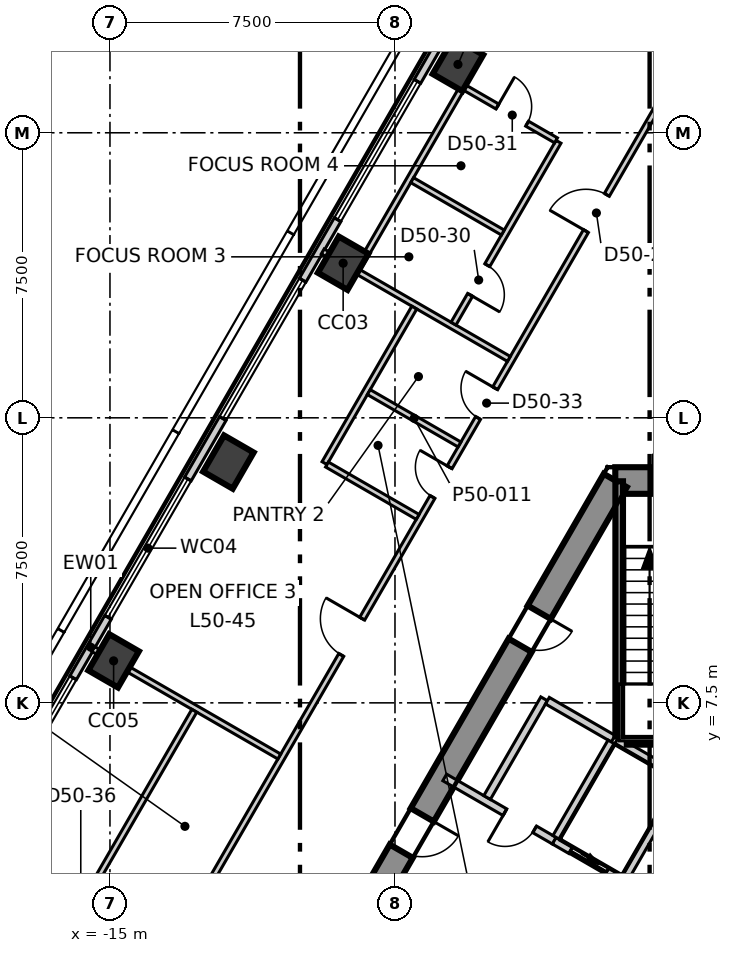
"""IFC4 building model, lengths in metres.
Left out: names, types, materials, properties, quantities, classifications, styles, units other than length and angle.
Written with IfcOpenShell. Run it as: python <this file> out.ifc"""

import sys

from ifc_helpers import new_model, si_unit, direction, frame, frame_2d, origin, origin_2d, place, context, subcontext, project, spatial, polyline, rectangle, outline, extrude, element, fill, save


model = new_model("IFC4")
c1 = context("Model", 3, precision=1e-05, world=origin(), true_north=direction((0.0, 1.0)))
c2 = subcontext(c1, "Body", "Model", "MODEL_VIEW")
j1 = project(units=[si_unit("LENGTHUNIT", "METRE"), si_unit("PLANEANGLEUNIT", "RADIAN")], contexts=[c1])
p1 = place(None, origin())
s1 = spatial("IfcSite", under=j1, at=p1, CompositionType="ELEMENT")
p2 = place(p1, origin())
s2 = spatial("IfcBuilding", under=s1, at=p2, CompositionType="ELEMENT")
p3 = place(p2, frame((0.0, 0.0, 215.3)))
s3 = spatial("IfcBuildingStorey", under=s2, at=p3, CompositionType="ELEMENT", Elevation=215.3)
p4 = place(p3, frame((1.703, 13.35, -0.3), z_axis=(0.0, 0.0, 1.0), x_axis=(-1.0, 0.0, 0.0)))
e1 = element("IfcWall", 1, at=p4, inside=s3, PredefinedType="SHEAR", context=c2, shape_type="SweptSolid", body=[
    extrude(outline(polyline([(-0.202, -0.35), (1.703, -0.35), (3.608, -0.35), (3.204, 0.35), (1.703, 0.35), (0.202, 0.35), (-0.202, -0.35)])), origin(), (0.0, 0.0, 1.0), 4.0),
])
p5 = place(p4, frame((1.003, 0.0, 0.3)))
e2 = element("IfcOpeningElement", 2, at=p5, cuts=e1, PredefinedType="OPENING", context=c2, shape_type="SweptSolid", body=[
    extrude(rectangle(XDim=1.4, YDim=2.1, at=frame_2d((0.7, 1.05))), frame((0.0, 0.36, 0.0), z_axis=(0.0, -1.0, 0.0), x_axis=(1.0, 0.0, 0.0)), (0.0, 0.0, 1.0), 0.72),
])
p6 = place(p3, frame((-1.703, 13.35, -0.3), z_axis=(0.0, 0.0, 1.0), x_axis=(-0.500011533395, -0.866018744874, 0.0)))
e3 = element("IfcWall", 3, at=p6, inside=s3, PredefinedType="SHEAR", context=c2, shape_type="SweptSolid", body=[
    extrude(outline(polyline([(-0.202, -0.35), (1.782, -0.35), (3.766, -0.35), (5.75, -0.35), (7.734, -0.35), (9.718, -0.35), (11.702, -0.35), (13.686, -0.35), (15.67, -0.35), (17.654, -0.35), (19.638, -0.35), (21.622, -0.35), (21.218, 0.35), (19.307, 0.35), (17.397, 0.35), (15.486, 0.35), (13.576, 0.35), (11.665, 0.35), (9.755, 0.35), (7.844, 0.35), (5.934, 0.35), (4.023, 0.35), (2.113, 0.35), (0.202, 0.35), (-0.202, -0.35)])), origin(), (0.0, 0.0, 1.0), 4.0),
])
p7 = place(p6, frame((10.16, 0.0, 0.3)))
e4 = element("IfcOpeningElement", 4, at=p7, cuts=e3, PredefinedType="OPENING", context=c2, shape_type="SweptSolid", body=[
    extrude(rectangle(XDim=1.1, YDim=2.1, at=frame_2d((0.55, 1.05))), frame((0.0, 0.36, 0.0), z_axis=(0.0, -1.0, 0.0), x_axis=(1.0, 0.0, 0.0)), (0.0, 0.0, 1.0), 0.72),
])
p8 = place(p6, frame((16.465, 0.0, 0.3)))
e5 = element("IfcOpeningElement", 5, at=p8, cuts=e3, PredefinedType="OPENING", context=c2, shape_type="SweptSolid", body=[
    extrude(rectangle(XDim=0.9, YDim=2.1, at=frame_2d((0.45, 1.05))), frame((0.0, 0.36, 0.0), z_axis=(0.0, -1.0, 0.0), x_axis=(1.0, 0.0, 0.0)), (0.0, 0.0, 1.0), 0.72),
])
p9 = place(p6, frame((4.005, 0.0, 0.3)))
e6 = element("IfcOpeningElement", 6, at=p9, cuts=e3, PredefinedType="OPENING", context=c2, shape_type="SweptSolid", body=[
    extrude(rectangle(XDim=1.0, YDim=2.1, at=frame_2d((0.5, 1.05))), frame((0.0, 0.36, 0.0), z_axis=(0.0, -1.0, 0.0), x_axis=(1.0, 0.0, 0.0)), (0.0, 0.0, 1.0), 0.72),
])
for number, where, z_axis, x_axis in (
    (7, (-5.843, 24.299, -0.3), (0.0, 0.0, 1.0), (0.5, 0.866, 0.0)),
    (8, (-8.864, 19.068, -0.3), (0.0, 0.0, 1.0), (0.5, 0.866, 0.0)),
    (9, (-11.884, 13.836, -0.3), (0.0, 0.0, 1.0), (0.5, 0.866, 0.0)),
    (10, (-14.904, 8.605, -0.3), (0.0, 0.0, 1.0), (0.5, 0.866, 0.0)),
):
    element("IfcColumn", number, at=place(p3, frame(where, z_axis=z_axis, x_axis=x_axis)), inside=s3, PredefinedType="COLUMN", context=c2, shape_type="SweptSolid", body=[
        extrude(rectangle(XDim=1.1, YDim=0.9, at=origin_2d()), origin(), (0.0, 0.0, 1.0), 4.0),
    ])
p10 = place(p3, frame((-2.778, 31.008, 0.0), z_axis=(0.0, 0.0, 1.0), x_axis=(-0.499999612413, -0.866025627558, 0.0)))
e11 = element("IfcWall", 11, at=p10, inside=s3, PredefinedType="ELEMENTEDWALL", context=c2, shape_type="SweptSolid", body=[
    extrude(rectangle(XDim=50.91, YDim=0.2, at=frame_2d((25.455, 0.0))), origin(), (0.0, 0.0, 1.0), 3.7),
])
p11 = place(p10, frame((2.223, 0.0, 0.9)))
e12 = element("IfcOpeningElement", 12, at=p11, cuts=e11, PredefinedType="OPENING", context=c2, shape_type="SweptSolid", body=[
    extrude(rectangle(XDim=4.2, YDim=2.5, at=frame_2d((2.1, 1.25))), frame((0.0, 0.11, 0.0), z_axis=(0.0, -1.0, 0.0), x_axis=(1.0, 0.0, 0.0)), (0.0, 0.0, 1.0), 0.22),
])
p12 = place(p10, frame((8.263, 0.0, 0.9)))
e13 = element("IfcOpeningElement", 13, at=p12, cuts=e11, PredefinedType="OPENING", context=c2, shape_type="SweptSolid", body=[
    extrude(rectangle(XDim=4.2, YDim=2.5, at=frame_2d((2.1, 1.25))), frame((0.0, 0.11, 0.0), z_axis=(0.0, -1.0, 0.0), x_axis=(1.0, 0.0, 0.0)), (0.0, 0.0, 1.0), 0.22),
])
p13 = place(p10, frame((14.304, 0.0, 0.9)))
e14 = element("IfcOpeningElement", 14, at=p13, cuts=e11, PredefinedType="OPENING", context=c2, shape_type="SweptSolid", body=[
    extrude(rectangle(XDim=4.2, YDim=2.5, at=frame_2d((2.1, 1.25))), frame((0.0, 0.11, 0.0), z_axis=(0.0, -1.0, 0.0), x_axis=(1.0, 0.0, 0.0)), (0.0, 0.0, 1.0), 0.22),
])
p14 = place(p10, frame((20.344, 0.0, 0.9)))
e15 = element("IfcOpeningElement", 15, at=p14, cuts=e11, PredefinedType="OPENING", context=c2, shape_type="SweptSolid", body=[
    extrude(rectangle(XDim=4.2, YDim=2.5, at=frame_2d((2.1, 1.25))), frame((0.0, 0.11, 0.0), z_axis=(0.0, -1.0, 0.0), x_axis=(1.0, 0.0, 0.0)), (0.0, 0.0, 1.0), 0.22),
])
p15 = place(p10, frame((26.385, 0.0, 0.9)))
e16 = element("IfcOpeningElement", 16, at=p15, cuts=e11, PredefinedType="OPENING", context=c2, shape_type="SweptSolid", body=[
    extrude(rectangle(XDim=4.2, YDim=2.5, at=frame_2d((2.1, 1.25))), frame((0.0, 0.11, 0.0), z_axis=(0.0, -1.0, 0.0), x_axis=(1.0, 0.0, 0.0)), (0.0, 0.0, 1.0), 0.22),
])
p16 = place(p10, frame((32.425, 0.0, 0.9)))
e17 = element("IfcOpeningElement", 17, at=p16, cuts=e11, PredefinedType="OPENING", context=c2, shape_type="SweptSolid", body=[
    extrude(rectangle(XDim=4.2, YDim=2.5, at=frame_2d((2.1, 1.25))), frame((0.0, 0.11, 0.0), z_axis=(0.0, -1.0, 0.0), x_axis=(1.0, 0.0, 0.0)), (0.0, 0.0, 1.0), 0.22),
])
p17 = place(p10, frame((38.466, 0.0, 0.9)))
e18 = element("IfcOpeningElement", 18, at=p17, cuts=e11, PredefinedType="OPENING", context=c2, shape_type="SweptSolid", body=[
    extrude(rectangle(XDim=4.2, YDim=2.5, at=frame_2d((2.1, 1.25))), frame((0.0, 0.11, 0.0), z_axis=(0.0, -1.0, 0.0), x_axis=(1.0, 0.0, 0.0)), (0.0, 0.0, 1.0), 0.22),
])
p18 = place(p10, frame((44.506, 0.0, 0.9)))
e19 = element("IfcOpeningElement", 19, at=p18, cuts=e11, PredefinedType="OPENING", context=c2, shape_type="SweptSolid", body=[
    extrude(rectangle(XDim=4.2, YDim=2.5, at=frame_2d((2.1, 1.25))), frame((0.0, 0.11, 0.0), z_axis=(0.0, -1.0, 0.0), x_axis=(1.0, 0.0, 0.0)), (0.0, 0.0, 1.0), 0.22),
])
p19 = place(p3, frame((-20.883, -11.97, 0.0), z_axis=(0.0, 0.0, 1.0), x_axis=(0.500006150555, 0.866021852731, 0.0)))
e20 = element("IfcWall", 20, at=p19, inside=s3, PredefinedType="PARTITIONING", context=c2, shape_type="SweptSolid", body=[
    extrude(rectangle(XDim=41.766, YDim=0.15, at=frame_2d((20.883, 0.0))), origin(), (0.0, 0.0, 1.0), 3.7),
])
p20 = place(p19, frame((36.816, 0.0, 0.0)))
e21 = element("IfcOpeningElement", 21, at=p20, cuts=e20, PredefinedType="OPENING", context=c2, shape_type="SweptSolid", body=[
    extrude(rectangle(XDim=1.1, YDim=2.1, at=frame_2d((0.55, 1.05))), frame((0.0, 0.085, 0.0), z_axis=(0.0, -1.0, 0.0), x_axis=(1.0, 0.0, 0.0)), (0.0, 0.0, 1.0), 0.17),
])
p21 = place(p19, frame((23.939, 0.0, 0.0)))
e22 = element("IfcOpeningElement", 22, at=p21, cuts=e20, PredefinedType="OPENING", context=c2, shape_type="SweptSolid", body=[
    extrude(rectangle(XDim=1.1, YDim=2.1, at=frame_2d((0.55, 1.05))), frame((0.0, 0.085, 0.0), z_axis=(0.0, -1.0, 0.0), x_axis=(1.0, 0.0, 0.0)), (0.0, 0.0, 1.0), 0.17),
])
p22 = place(p19, frame((31.139, 0.0, 0.0)))
e23 = element("IfcOpeningElement", 23, at=p22, cuts=e20, PredefinedType="OPENING", context=c2, shape_type="SweptSolid", body=[
    extrude(rectangle(XDim=0.9, YDim=2.1, at=frame_2d((0.45, 1.05))), frame((0.0, 0.085, 0.0), z_axis=(0.0, -1.0, 0.0), x_axis=(1.0, 0.0, 0.0)), (0.0, 0.0, 1.0), 0.17),
])
p23 = place(p19, frame((28.739, 0.0, 0.0)))
e24 = element("IfcOpeningElement", 24, at=p23, cuts=e20, PredefinedType="OPENING", context=c2, shape_type="SweptSolid", body=[
    extrude(rectangle(XDim=0.9, YDim=2.1, at=frame_2d((0.45, 1.05))), frame((0.0, 0.085, 0.0), z_axis=(0.0, -1.0, 0.0), x_axis=(1.0, 0.0, 0.0)), (0.0, 0.0, 1.0), 0.17),
])
p24 = place(p19, frame((14.258, 0.0, 0.0)))
e25 = element("IfcOpeningElement", 25, at=p24, cuts=e20, PredefinedType="OPENING", context=c2, shape_type="SweptSolid", body=[
    extrude(rectangle(XDim=1.1, YDim=2.1, at=frame_2d((0.55, 1.05))), frame((0.0, 0.085, 0.0), z_axis=(0.0, -1.0, 0.0), x_axis=(1.0, 0.0, 0.0)), (0.0, 0.0, 1.0), 0.17),
])
p25 = place(p19, frame((3.777, 0.0, 0.0)))
e26 = element("IfcOpeningElement", 26, at=p25, cuts=e20, PredefinedType="OPENING", context=c2, shape_type="SweptSolid", body=[
    extrude(rectangle(XDim=1.1, YDim=2.1, at=frame_2d((0.55, 1.05))), frame((0.0, 0.085, 0.0), z_axis=(0.0, -1.0, 0.0), x_axis=(1.0, 0.0, 0.0)), (0.0, 0.0, 1.0), 0.17),
])
p26 = place(p3, frame((-15.441, 8.915, 0.0), z_axis=(0.0, 0.0, 1.0), x_axis=(0.866034596441, -0.499984077514, 0.0)))
e27 = element("IfcWall", 27, at=p26, inside=s3, PredefinedType="PARTITIONING", context=c2, shape_type="SweptSolid", body=[
    extrude(rectangle(XDim=5.655, YDim=0.15, at=frame_2d((2.827, 0.0))), origin(), (0.0, 0.0, 1.0), 3.2),
])
p27 = place(p3, frame((-9.401, 19.378, 0.0), z_axis=(0.0, 0.0, 1.0), x_axis=(0.866021685936, -0.500006439447, 0.0)))
e28 = element("IfcWall", 28, at=p27, inside=s3, PredefinedType="PARTITIONING", context=c2, shape_type="SweptSolid", body=[
    extrude(rectangle(XDim=5.656, YDim=0.15, at=frame_2d((2.828, 0.0))), origin(), (0.0, 0.0, 1.0), 3.7),
])
p28 = place(p3, frame((-9.354, 13.808, 0.0), z_axis=(0.0, 0.0, 1.0), x_axis=(0.499946109042, 0.866056515508, 0.0)))
e29 = element("IfcWall", 29, at=p28, inside=s3, PredefinedType="PARTITIONING", context=c2, shape_type="SweptSolid", body=[
    extrude(rectangle(XDim=4.725, YDim=0.15, at=frame_2d((2.362, 0.0))), origin(), (0.0, 0.0, 1.0), 3.7),
])
p29 = place(p3, frame((-9.289, 13.771, 0.0), z_axis=(0.0, 0.0, 1.0), x_axis=(0.865965703354, -0.500103389924, 0.0)))
e30 = element("IfcWall", 30, at=p29, inside=s3, PredefinedType="PARTITIONING", context=c2, shape_type="SweptSolid", body=[
    extrude(rectangle(XDim=2.755, YDim=0.15, at=frame_2d((1.378, 0.0))), origin(), (0.0, 0.0, 1.0), 3.7),
])
p30 = place(p3, frame((-8.189, 15.676, 0.0), z_axis=(0.0, 0.0, 1.0), x_axis=(0.866119184418, -0.499837531988, 0.0)))
e31 = element("IfcWall", 31, at=p30, inside=s3, PredefinedType="PARTITIONING", context=c2, shape_type="SweptSolid", body=[
    extrude(rectangle(XDim=2.755, YDim=0.15, at=frame_2d((1.377, 0.0))), origin(), (0.0, 0.0, 1.0), 3.7),
])
p31 = place(p3, frame((-18.746, -3.04, 0.0), z_axis=(0.0, 0.0, 1.0), x_axis=(0.499992887898, 0.866029509919, 0.0)))
e32 = element("IfcWall", 32, at=p31, inside=s3, PredefinedType="PARTITIONING", context=c2, shape_type="SweptSolid", body=[
    extrude(rectangle(XDim=11.93, YDim=0.15, at=frame_2d((5.965, 0.0))), origin(), (0.0, 0.0, 1.0), 3.7),
])
p32 = place(p31, frame((5.456, 0.0, 0.0)))
e33 = element("IfcOpeningElement", 33, at=p32, cuts=e32, PredefinedType="OPENING", context=c2, shape_type="SweptSolid", body=[
    extrude(rectangle(XDim=1.0, YDim=2.1, at=frame_2d((0.5, 1.05))), frame((0.0, 0.085, 0.0), z_axis=(0.0, -1.0, 0.0), x_axis=(1.0, 0.0, 0.0)), (0.0, 0.0, 1.0), 0.17),
])
p33 = place(p3, frame((-8.475, 18.93, 0.0), z_axis=(0.0, 0.0, 1.0), x_axis=(0.499931554694, 0.866064917094, 0.0)))
e34 = element("IfcWall", 34, at=p33, inside=s3, PredefinedType="PARTITIONING", context=c2, shape_type="SweptSolid", body=[
    extrude(rectangle(XDim=5.525, YDim=0.15, at=frame_2d((2.763, 0.0))), origin(), (0.0, 0.0, 1.0), 2.95),
])
p34 = place(p3, frame((-5.96, 17.478, 0.0), z_axis=(0.0, 0.0, 1.0), x_axis=(0.500050108258, 0.865996471835, 0.0)))
e35 = element("IfcWall", 35, at=p34, inside=s3, PredefinedType="PARTITIONING", context=c2, shape_type="SweptSolid", body=[
    extrude(rectangle(XDim=5.525, YDim=0.15, at=frame_2d((2.763, 0.0))), origin(), (0.0, 0.0, 1.0), 3.7),
])
p35 = place(p34, frame((0.875, 0.0, 0.0)))
e36 = element("IfcOpeningElement", 36, at=p35, cuts=e35, PredefinedType="OPENING", context=c2, shape_type="SweptSolid", body=[
    extrude(rectangle(XDim=0.9, YDim=2.1, at=frame_2d((0.45, 1.05))), frame((0.0, 0.085, 0.0), z_axis=(0.0, -1.0, 0.0), x_axis=(1.0, 0.0, 0.0)), (0.0, 0.0, 1.0), 0.17),
])
p36 = place(p3, frame((-5.648, 23.678, 0.0), z_axis=(0.0, 0.0, 1.0), x_axis=(0.865965703354, -0.500103389924, 0.0)))
e37 = element("IfcWall", 37, at=p36, inside=s3, PredefinedType="PARTITIONING", context=c2, shape_type="SweptSolid", body=[
    extrude(rectangle(XDim=2.755, YDim=0.15, at=frame_2d((1.378, 0.0))), origin(), (0.0, 0.0, 1.0), 3.7),
])
p37 = place(p36, frame((0.975, 0.0, 0.0)))
e38 = element("IfcOpeningElement", 38, at=p37, cuts=e37, PredefinedType="OPENING", context=c2, shape_type="SweptSolid", body=[
    extrude(rectangle(XDim=0.9, YDim=2.1, at=frame_2d((0.45, 1.05))), frame((0.0, 0.085, 0.0), z_axis=(0.0, -1.0, 0.0), x_axis=(1.0, 0.0, 0.0)), (0.0, 0.0, 1.0), 0.17),
])
p38 = place(p3, frame((-7.048, 21.253, 0.0), z_axis=(0.0, 0.0, 1.0), x_axis=(0.865965703354, -0.500103389924, 0.0)))
e39 = element("IfcWall", 39, at=p38, inside=s3, PredefinedType="PARTITIONING", context=c2, shape_type="SweptSolid", body=[
    extrude(rectangle(XDim=2.755, YDim=0.15, at=frame_2d((1.378, 0.0))), origin(), (0.0, 0.0, 1.0), 3.7),
])
p39 = place(p3, frame((-6.191, 5.537, 0.0), z_axis=(0.0, 0.0, 1.0), x_axis=(0.866052607023, -0.499952879648, 0.0)))
e40 = element("IfcWall", 40, at=p39, inside=s3, PredefinedType="SOLIDWALL", context=c2, shape_type="SweptSolid", body=[
    extrude(rectangle(XDim=3.332, YDim=0.2, at=frame_2d((1.666, 0.0))), origin(), (0.0, 0.0, 1.0), 3.7),
])
p40 = place(p39, frame((1.83, 0.0, 0.0)))
e41 = element("IfcOpeningElement", 41, at=p40, cuts=e40, PredefinedType="OPENING", context=c2, shape_type="SweptSolid", body=[
    extrude(rectangle(XDim=0.9, YDim=2.1, at=frame_2d((0.45, 1.05))), frame((0.0, 0.11, 0.0), z_axis=(0.0, -1.0, 0.0), x_axis=(1.0, 0.0, 0.0)), (0.0, 0.0, 1.0), 0.22),
])
p41 = place(p3, frame((-5.076, 5.009, 0.0), z_axis=(0.0, 0.0, 1.0), x_axis=(0.50002537861, 0.866010750942, 0.0)))
e42 = element("IfcWall", 42, at=p41, inside=s3, PredefinedType="SOLIDWALL", context=c2, shape_type="SweptSolid", body=[
    extrude(rectangle(XDim=3.0, YDim=0.2, at=frame_2d((1.5, 0.0))), origin(), (0.0, 0.0, 1.0), 3.7),
])
p42 = place(p3, frame((-3.489, 7.557, 0.0), z_axis=(0.0, 0.0, 1.0), x_axis=(0.866010750942, -0.50002537861, 0.0)))
e43 = element("IfcWall", 43, at=p42, inside=s3, PredefinedType="SOLIDWALL", context=c2, shape_type="SweptSolid", body=[
    extrude(rectangle(XDim=2.0, YDim=0.2, at=frame_2d((1.0, 0.0))), origin(), (0.0, 0.0, 1.0), 3.7),
])
p43 = place(p3, frame((-3.309, 3.873, 0.0), z_axis=(0.0, 0.0, 1.0), x_axis=(0.866098583652, -0.499873227325, 0.0)))
e44 = element("IfcWall", 44, at=p43, inside=s3, PredefinedType="SOLIDWALL", context=c2, shape_type="SweptSolid", body=[
    extrude(rectangle(XDim=2.103, YDim=0.2, at=frame_2d((1.051, 0.0))), origin(), (0.0, 0.0, 1.0), 3.7),
])
p44 = place(p43, frame((0.502, 0.0, 0.0)))
e45 = element("IfcOpeningElement", 45, at=p44, cuts=e44, PredefinedType="OPENING", context=c2, shape_type="SweptSolid", body=[
    extrude(rectangle(XDim=1.1, YDim=2.1, at=frame_2d((0.55, 1.05))), frame((0.0, 0.11, 0.0), z_axis=(0.0, -1.0, 0.0), x_axis=(1.0, 0.0, 0.0)), (0.0, 0.0, 1.0), 0.22),
])
p45 = place(p3, frame((-3.257, 3.959, 0.0), z_axis=(0.0, 0.0, 1.0), x_axis=(0.50012328804, 0.865954211699, 0.0)))
e46 = element("IfcWall", 46, at=p45, inside=s3, PredefinedType="SOLIDWALL", context=c2, shape_type="SweptSolid", body=[
    extrude(rectangle(XDim=2.9, YDim=0.2, at=frame_2d((1.45, 0.0))), origin(), (0.0, 0.0, 1.0), 3.7),
])
p46 = place(p3, frame((-1.67, 6.507, 0.0), z_axis=(0.0, 0.0, 1.0), x_axis=(0.865941441609, -0.500145398563, 0.0)))
e47 = element("IfcWall", 47, at=p46, inside=s3, PredefinedType="SOLIDWALL", context=c2, shape_type="SweptSolid", body=[
    extrude(rectangle(XDim=1.815, YDim=0.2, at=frame_2d((0.908, 0.0))), origin(), (0.0, 0.0, 1.0), 3.7),
])
p47 = place(p3, frame((-1.438, 2.909, 0.0), z_axis=(0.0, 0.0, 1.0), x_axis=(0.499829630636, 0.866123744241, 0.0)))
e48 = element("IfcWall", 48, at=p47, inside=s3, PredefinedType="SOLIDWALL", context=c2, shape_type="SweptSolid", body=[
    extrude(rectangle(XDim=2.761, YDim=0.2, at=frame_2d((1.38, 0.0))), origin(), (0.0, 0.0, 1.0), 3.7),
])
p48 = place(p3, frame((-1.4, 6.5, 0.0), z_axis=(0.0, 0.0, 1.0), x_axis=(1.0, 0.0, 0.0)))
e49 = element("IfcWall", 49, at=p48, inside=s3, PredefinedType="SOLIDWALL", context=c2, shape_type="SweptSolid", body=[
    extrude(rectangle(XDim=2.8, YDim=0.2, at=frame_2d((1.4, 0.0))), origin(), (0.0, 0.0, 1.0), 3.7),
])
p49 = place(p3, frame((-1.6, 6.615, 0.0), z_axis=(0.0, 0.0, 1.0), x_axis=(0.0, 1.0, 0.0)))
e50 = element("IfcWall", 50, at=p49, inside=s3, PredefinedType="SOLIDWALL", context=c2, shape_type="SweptSolid", body=[
    extrude(rectangle(XDim=6.715, YDim=0.2, at=frame_2d((3.357, 0.0))), origin(), (0.0, 0.0, 1.0), 3.7),
])
p50 = place(p12, origin())
e51 = element("IfcWindow", 51, at=p50, inside=s3, PartitioningType="SINGLE_PANEL", PredefinedType="WINDOW", context=c2, shape_type="SweptSolid", body=[
    extrude(rectangle(XDim=4.2, YDim=2.5, at=frame_2d((2.1, 1.25))), frame((0.0, 0.03, 0.0), z_axis=(0.0, -1.0, 0.0), x_axis=(1.0, 0.0, 0.0)), (0.0, 0.0, 1.0), 0.06),
])
fill(e13, e51)
p51 = place(p13, origin())
e52 = element("IfcWindow", 52, at=p51, inside=s3, PartitioningType="SINGLE_PANEL", PredefinedType="WINDOW", context=c2, shape_type="SweptSolid", body=[
    extrude(rectangle(XDim=4.2, YDim=2.5, at=frame_2d((2.1, 1.25))), frame((0.0, 0.03, 0.0), z_axis=(0.0, -1.0, 0.0), x_axis=(1.0, 0.0, 0.0)), (0.0, 0.0, 1.0), 0.06),
])
fill(e14, e52)
p52 = place(p14, origin())
e53 = element("IfcWindow", 53, at=p52, inside=s3, PartitioningType="SINGLE_PANEL", PredefinedType="WINDOW", context=c2, shape_type="SweptSolid", body=[
    extrude(rectangle(XDim=4.2, YDim=2.5, at=frame_2d((2.1, 1.25))), frame((0.0, 0.03, 0.0), z_axis=(0.0, -1.0, 0.0), x_axis=(1.0, 0.0, 0.0)), (0.0, 0.0, 1.0), 0.06),
])
fill(e15, e53)
p53 = place(p15, origin())
e54 = element("IfcWindow", 54, at=p53, inside=s3, PartitioningType="SINGLE_PANEL", PredefinedType="WINDOW", context=c2, shape_type="SweptSolid", body=[
    extrude(rectangle(XDim=4.2, YDim=2.5, at=frame_2d((2.1, 1.25))), frame((0.0, 0.03, 0.0), z_axis=(0.0, -1.0, 0.0), x_axis=(1.0, 0.0, 0.0)), (0.0, 0.0, 1.0), 0.06),
])
fill(e16, e54)
p54 = place(p44, origin())
e55 = element("IfcDoor", 55, at=p54, inside=s3, OperationType="SLIDING_TO_LEFT", PredefinedType="DOOR", context=c2, shape_type="SweptSolid", body=[
    extrude(rectangle(XDim=1.1, YDim=2.1, at=frame_2d((0.55, 1.05))), frame((0.0, 0.025, 0.0), z_axis=(0.0, -1.0, 0.0), x_axis=(1.0, 0.0, 0.0)), (0.0, 0.0, 1.0), 0.05),
])
fill(e45, e55)
p55 = place(p40, origin())
e56 = element("IfcDoor", 56, at=p55, inside=s3, OperationType="SINGLE_SWING_LEFT", PredefinedType="DOOR", context=c2, shape_type="SweptSolid", body=[
    extrude(rectangle(XDim=0.9, YDim=2.1, at=frame_2d((0.45, 1.05))), frame((0.0, 0.025, 0.0), z_axis=(0.0, -1.0, 0.0), x_axis=(1.0, 0.0, 0.0)), (0.0, 0.0, 1.0), 0.05),
])
fill(e41, e56)
p56 = place(p20, origin())
e57 = element("IfcDoor", 57, at=p56, inside=s3, OperationType="SINGLE_SWING_RIGHT", PredefinedType="DOOR", context=c2, shape_type="SweptSolid", body=[
    extrude(rectangle(XDim=1.1, YDim=2.1, at=frame_2d((0.55, 1.05))), frame((0.0, 0.025, 0.0), z_axis=(0.0, -1.0, 0.0), x_axis=(1.0, 0.0, 0.0)), (0.0, 0.0, 1.0), 0.05),
])
fill(e21, e57)
p57 = place(p35, origin())
e58 = element("IfcDoor", 58, at=p57, inside=s3, OperationType="SINGLE_SWING_LEFT", PredefinedType="DOOR", context=c2, shape_type="SweptSolid", body=[
    extrude(rectangle(XDim=0.9, YDim=2.1, at=frame_2d((0.45, 1.05))), frame((0.0, 0.025, 0.0), z_axis=(0.0, -1.0, 0.0), x_axis=(1.0, 0.0, 0.0)), (0.0, 0.0, 1.0), 0.05),
])
fill(e36, e58)
p58 = place(p37, origin())
e59 = element("IfcDoor", 59, at=p58, inside=s3, OperationType="SINGLE_SWING_RIGHT", PredefinedType="DOOR", context=c2, shape_type="SweptSolid", body=[
    extrude(rectangle(XDim=0.9, YDim=2.1, at=frame_2d((0.45, 1.05))), frame((0.0, 0.025, 0.0), z_axis=(0.0, -1.0, 0.0), x_axis=(1.0, 0.0, 0.0)), (0.0, 0.0, 1.0), 0.05),
])
fill(e38, e59)
p59 = place(p21, origin())
e60 = element("IfcDoor", 60, at=p59, inside=s3, OperationType="SINGLE_SWING_LEFT", PredefinedType="DOOR", context=c2, shape_type="SweptSolid", body=[
    extrude(rectangle(XDim=1.1, YDim=2.1, at=frame_2d((0.55, 1.05))), frame((0.0, 0.025, 0.0), z_axis=(0.0, -1.0, 0.0), x_axis=(1.0, 0.0, 0.0)), (0.0, 0.0, 1.0), 0.05),
])
fill(e22, e60)
p60 = place(p22, origin())
e61 = element("IfcDoor", 61, at=p60, inside=s3, OperationType="SINGLE_SWING_LEFT", PredefinedType="DOOR", context=c2, shape_type="SweptSolid", body=[
    extrude(rectangle(XDim=0.9, YDim=2.1, at=frame_2d((0.45, 1.05))), frame((0.0, 0.025, 0.0), z_axis=(0.0, -1.0, 0.0), x_axis=(1.0, 0.0, 0.0)), (0.0, 0.0, 1.0), 0.05),
])
fill(e23, e61)
p61 = place(p23, origin())
e62 = element("IfcDoor", 62, at=p61, inside=s3, OperationType="SINGLE_SWING_LEFT", PredefinedType="DOOR", context=c2, shape_type="SweptSolid", body=[
    extrude(rectangle(XDim=0.9, YDim=2.1, at=frame_2d((0.45, 1.05))), frame((0.0, 0.025, 0.0), z_axis=(0.0, -1.0, 0.0), x_axis=(1.0, 0.0, 0.0)), (0.0, 0.0, 1.0), 0.05),
])
fill(e24, e62)
p62 = place(p7, origin())
e63 = element("IfcDoor", 63, at=p62, inside=s3, OperationType="SINGLE_SWING_RIGHT", PredefinedType="DOOR", context=c2, shape_type="SweptSolid", body=[
    extrude(rectangle(XDim=1.1, YDim=2.1, at=frame_2d((0.55, 1.05))), frame((0.0, 0.025, 0.0), z_axis=(0.0, -1.0, 0.0), x_axis=(1.0, 0.0, 0.0)), (0.0, 0.0, 1.0), 0.05),
])
fill(e4, e63)
p63 = place(p9, origin())
e64 = element("IfcDoor", 64, at=p63, inside=s3, OperationType="SINGLE_SWING_RIGHT", PredefinedType="DOOR", context=c2, shape_type="SweptSolid", body=[
    extrude(rectangle(XDim=1.0, YDim=2.1, at=frame_2d((0.5, 1.05))), frame((0.0, 0.025, 0.0), z_axis=(0.0, -1.0, 0.0), x_axis=(1.0, 0.0, 0.0)), (0.0, 0.0, 1.0), 0.05),
])
fill(e6, e64)
save(model, sys.argv[1])
